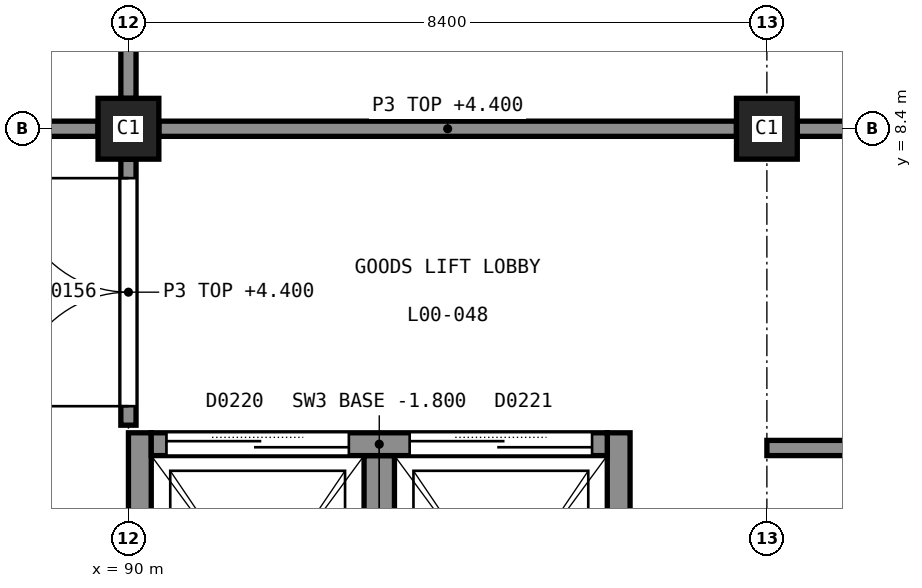
"""IFC4 building model, lengths in metres.
Left out: names, types, materials, properties, quantities, classifications, styles, units other than length and angle.
Written with IfcOpenShell. Run it as: python <this file> out.ifc"""

import sys

from ifc_helpers import new_model, si_unit, direction, frame, frame_2d, origin, origin_2d, place, context, subcontext, project, spatial, rectangle, extrude, element, fill, save


model = new_model("IFC4")
c1 = context("Model", 3, precision=1e-05, world=origin(), true_north=direction((0.0, 1.0)))
c2 = subcontext(c1, "Body", "Model", "MODEL_VIEW")
j1 = project(units=[si_unit("LENGTHUNIT", "METRE"), si_unit("PLANEANGLEUNIT", "RADIAN")], contexts=[c1])
p1 = place(None, origin())
s1 = spatial("IfcSite", under=j1, at=p1, CompositionType="ELEMENT")
p2 = place(p1, origin())
s2 = spatial("IfcBuilding", under=s1, at=p2, CompositionType="ELEMENT")
p3 = place(p2, origin())
s3 = spatial("IfcBuildingStorey", under=s2, at=p3, CompositionType="ELEMENT", Elevation=0.0)
for number, where, z_axis, x_axis in (
    (1, (90.15, 0.3, -1.8), (0.0, 0.0, 1.0), (0.0, 1.0, 0.0)),
    (2, (96.45, 0.3, -1.8), (0.0, 0.0, 1.0), (0.0, 1.0, 0.0)),
):
    element("IfcWall", number, at=place(p3, frame(where, z_axis=z_axis, x_axis=x_axis)), inside=s3, PredefinedType="SHEAR", context=c2, shape_type="SweptSolid", body=[
        extrude(rectangle(XDim=4.1, YDim=0.3, at=frame_2d((2.05, 0.0))), origin(), (0.0, 0.0, 1.0), 7.3),
    ])
p4 = place(p3, frame((90.3, 4.25, -1.8), z_axis=(0.0, 0.0, 1.0), x_axis=(1.0, 0.0, 0.0)))
e3 = element("IfcWall", 3, at=p4, inside=s3, PredefinedType="SHEAR", context=c2, shape_type="SweptSolid", body=[
    extrude(rectangle(XDim=6.0, YDim=0.3, at=frame_2d((3.0, 0.0))), origin(), (0.0, 0.0, 1.0), 7.3),
])
p5 = place(p4, frame((0.2, 0.0, 1.8)))
e4 = element("IfcOpeningElement", 4, at=p5, cuts=e3, PredefinedType="OPENING", context=c2, shape_type="SweptSolid", body=[
    extrude(rectangle(XDim=2.4, YDim=2.4, at=frame_2d((1.2, 1.2))), frame((0.0, 0.16, 0.0), z_axis=(0.0, -1.0, 0.0), x_axis=(1.0, 0.0, 0.0)), (0.0, 0.0, 1.0), 0.32),
])
p6 = place(p4, frame((3.4, 0.0, 1.8)))
e5 = element("IfcOpeningElement", 5, at=p6, cuts=e3, PredefinedType="OPENING", context=c2, shape_type="SweptSolid", body=[
    extrude(rectangle(XDim=2.4, YDim=2.4, at=frame_2d((1.2, 1.2))), frame((0.0, 0.16, 0.0), z_axis=(0.0, -1.0, 0.0), x_axis=(1.0, 0.0, 0.0)), (0.0, 0.0, 1.0), 0.32),
])
p7 = place(p3, frame((93.3, 0.3, -1.8), z_axis=(0.0, 0.0, 1.0), x_axis=(0.0, 1.0, 0.0)))
e6 = element("IfcWall", 6, at=p7, inside=s3, PredefinedType="SHEAR", context=c2, shape_type="SweptSolid", body=[
    extrude(rectangle(XDim=3.8, YDim=0.4, at=frame_2d((1.9, 0.0))), origin(), (0.0, 0.0, 1.0), 7.3),
])
for number, where, z_axis, x_axis in (
    (7, (90.0, 8.4, -0.3), (0.0, 0.0, 1.0), (1.0, 0.0, 0.0)),
    (8, (98.4, 8.4, -0.3), (0.0, 0.0, 1.0), (1.0, 0.0, 0.0)),
):
    element("IfcColumn", number, at=place(p3, frame(where, z_axis=z_axis, x_axis=x_axis)), inside=s3, PredefinedType="COLUMN", context=c2, shape_type="SweptSolid", body=[
        extrude(rectangle(XDim=0.8, YDim=0.8, at=origin_2d()), origin(), (0.0, 0.0, 1.0), 5.8),
    ])
p8 = place(p3, frame((90.0, 8.8, 0.0), z_axis=(0.0, 0.0, 1.0), x_axis=(0.0, 1.0, 0.0)))
e9 = element("IfcWall", 9, at=p8, inside=s3, PredefinedType="PARTITIONING", context=c2, shape_type="SweptSolid", body=[
    extrude(rectangle(XDim=7.6, YDim=0.2, at=frame_2d((3.8, 0.0))), origin(), (0.0, 0.0, 1.0), 4.4),
])
p9 = place(p8, frame((4.075, 0.0, 0.0)))
e10 = element("IfcOpeningElement", 10, at=p9, cuts=e9, PredefinedType="OPENING", context=c2, shape_type="SweptSolid", body=[
    extrude(rectangle(XDim=3.0, YDim=3.0, at=frame_2d((1.5, 1.5))), frame((0.0, 0.11, 0.0), z_axis=(0.0, -1.0, 0.0), x_axis=(1.0, 0.0, 0.0)), (0.0, 0.0, 1.0), 0.22),
])
p10 = place(p3, frame((82.0, 8.4, 0.0), z_axis=(0.0, 0.0, 1.0), x_axis=(1.0, 0.0, 0.0)))
e11 = element("IfcWall", 11, at=p10, inside=s3, PredefinedType="PARTITIONING", context=c2, shape_type="SweptSolid", body=[
    extrude(rectangle(XDim=7.6, YDim=0.2, at=frame_2d((3.8, 0.0))), origin(), (0.0, 0.0, 1.0), 4.4),
])
p11 = place(p10, frame((0.525, 0.0, 0.0)))
e12 = element("IfcOpeningElement", 12, at=p11, cuts=e11, PredefinedType="OPENING", context=c2, shape_type="SweptSolid", body=[
    extrude(rectangle(XDim=3.0, YDim=3.0, at=frame_2d((1.5, 1.5))), frame((0.0, 0.11, 0.0), z_axis=(0.0, -1.0, 0.0), x_axis=(1.0, 0.0, 0.0)), (0.0, 0.0, 1.0), 0.22),
])
p12 = place(p3, frame((90.4, 8.4, 0.0), z_axis=(0.0, 0.0, 1.0), x_axis=(1.0, 0.0, 0.0)))
e13 = element("IfcWall", 13, at=p12, inside=s3, PredefinedType="PARTITIONING", context=c2, shape_type="SweptSolid", body=[
    extrude(rectangle(XDim=7.6, YDim=0.2, at=frame_2d((3.8, 0.0))), origin(), (0.0, 0.0, 1.0), 4.4),
])
p13 = place(p3, frame((98.8, 8.4, 0.0), z_axis=(0.0, 0.0, 1.0), x_axis=(1.0, 0.0, 0.0)))
e14 = element("IfcWall", 14, at=p13, inside=s3, PredefinedType="PARTITIONING", context=c2, shape_type="SweptSolid", body=[
    extrude(rectangle(XDim=7.6, YDim=0.2, at=frame_2d((3.8, 0.0))), origin(), (0.0, 0.0, 1.0), 4.4),
])
p14 = place(p3, frame((98.4, 4.2, 0.0), z_axis=(0.0, 0.0, 1.0), x_axis=(1.0, 0.0, 0.0)))
e15 = element("IfcWall", 15, at=p14, inside=s3, PredefinedType="PARTITIONING", context=c2, shape_type="SweptSolid", body=[
    extrude(rectangle(XDim=8.4, YDim=0.2, at=frame_2d((4.2, 0.0))), origin(), (0.0, 0.0, 1.0), 4.4),
])
p15 = place(p14, frame((5.625, 0.0, 0.0)))
e16 = element("IfcOpeningElement", 16, at=p15, cuts=e15, PredefinedType="OPENING", context=c2, shape_type="SweptSolid", body=[
    extrude(rectangle(XDim=1.0, YDim=2.1, at=frame_2d((0.5, 1.05))), frame((0.0, 0.11, 0.0), z_axis=(0.0, -1.0, 0.0), x_axis=(1.0, 0.0, 0.0)), (0.0, 0.0, 1.0), 0.22),
])
p16 = place(p3, frame((90.0, 4.5, 0.0), z_axis=(0.0, 0.0, 1.0), x_axis=(0.0, 1.0, 0.0)))
e17 = element("IfcWall", 17, at=p16, inside=s3, PredefinedType="PARTITIONING", context=c2, shape_type="SweptSolid", body=[
    extrude(rectangle(XDim=3.5, YDim=0.2, at=frame_2d((1.75, 0.0))), origin(), (0.0, 0.0, 1.0), 4.4),
])
p17 = place(p16, frame((0.25, 0.0, 0.0)))
e18 = element("IfcOpeningElement", 18, at=p17, cuts=e17, PredefinedType="OPENING", context=c2, shape_type="SweptSolid", body=[
    extrude(rectangle(XDim=3.0, YDim=3.0, at=frame_2d((1.5, 1.5))), frame((0.0, 0.11, 0.0), z_axis=(0.0, -1.0, 0.0), x_axis=(1.0, 0.0, 0.0)), (0.0, 0.0, 1.0), 0.22),
])
p18 = place(p17, origin())
e19 = element("IfcDoor", 19, at=p18, inside=s3, OperationType="DOUBLE_DOOR_SINGLE_SWING", PredefinedType="DOOR", context=c2, shape_type="SweptSolid", body=[
    extrude(rectangle(XDim=3.0, YDim=3.0, at=frame_2d((1.5, 1.5))), frame((0.0, 0.025, 0.0), z_axis=(0.0, -1.0, 0.0), x_axis=(1.0, 0.0, 0.0)), (0.0, 0.0, 1.0), 0.05),
])
fill(e18, e19)
p19 = place(p5, origin())
e20 = element("IfcDoor", 20, at=p19, inside=s3, OperationType="DOUBLE_DOOR_SLIDING", PredefinedType="DOOR", context=c2, shape_type="SweptSolid", body=[
    extrude(rectangle(XDim=2.4, YDim=2.4, at=frame_2d((1.2, 1.2))), frame((0.0, 0.025, 0.0), z_axis=(0.0, -1.0, 0.0), x_axis=(1.0, 0.0, 0.0)), (0.0, 0.0, 1.0), 0.05),
])
fill(e4, e20)
p20 = place(p6, origin())
e21 = element("IfcDoor", 21, at=p20, inside=s3, OperationType="DOUBLE_DOOR_SLIDING", PredefinedType="DOOR", context=c2, shape_type="SweptSolid", body=[
    extrude(rectangle(XDim=2.4, YDim=2.4, at=frame_2d((1.2, 1.2))), frame((0.0, 0.025, 0.0), z_axis=(0.0, -1.0, 0.0), x_axis=(1.0, 0.0, 0.0)), (0.0, 0.0, 1.0), 0.05),
])
fill(e5, e21)
save(model, sys.argv[1])
